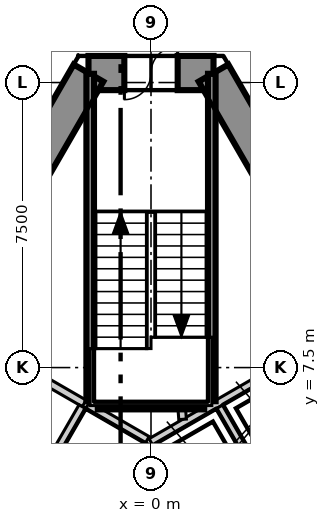
"""IFC4 building model, lengths in metres.
Left out: names, types, materials, properties, quantities, classifications, styles, units other than length and angle.
Written with IfcOpenShell. Run it as: python <this file> out.ifc"""

import sys

from ifc_helpers import new_model, si_unit, direction, frame, frame_2d, origin, place, context, subcontext, project, spatial, polyline, rectangle, outline, extrude, element, fill, save


model = new_model("IFC4")
c1 = context("Model", 3, precision=1e-05, world=origin(), true_north=direction((0.0, 1.0)))
c2 = subcontext(c1, "Body", "Model", "MODEL_VIEW")
j1 = project(units=[si_unit("LENGTHUNIT", "METRE"), si_unit("PLANEANGLEUNIT", "RADIAN")], contexts=[c1])
p1 = place(None, origin())
s1 = spatial("IfcSite", under=j1, at=p1, CompositionType="ELEMENT")
p2 = place(p1, origin())
s2 = spatial("IfcBuilding", under=s1, at=p2, CompositionType="ELEMENT")
p3 = place(p2, frame((0.0, 0.0, 71.3)))
s3 = spatial("IfcBuildingStorey", under=s2, at=p3, CompositionType="ELEMENT", Elevation=71.3)
p4 = place(p3, frame((1.645, 15.25, -0.3), z_axis=(0.0, 0.0, 1.0), x_axis=(-1.0, 0.0, 0.0)))
e1 = element("IfcWall", 1, at=p4, inside=s3, PredefinedType="SHEAR", context=c2, shape_type="SweptSolid", body=[
    extrude(outline(polyline([(-0.26, -0.45), (1.645, -0.45), (3.55, -0.45), (3.031, 0.45), (1.645, 0.45), (0.259, 0.45), (-0.26, -0.45)])), origin(), (0.0, 0.0, 1.0), 4.0),
])
p5 = place(p4, frame((0.945, 0.0, 0.3)))
e2 = element("IfcOpeningElement", 2, at=p5, cuts=e1, PredefinedType="OPENING", context=c2, shape_type="SweptSolid", body=[
    extrude(rectangle(XDim=1.4, YDim=2.1, at=frame_2d((0.7, 1.05))), frame((0.0, 0.46, 0.0), z_axis=(0.0, -1.0, 0.0), x_axis=(1.0, 0.0, 0.0)), (0.0, 0.0, 1.0), 0.92),
])
p6 = place(p3, frame((-1.645, 15.25, -0.3), z_axis=(0.0, 0.0, 1.0), x_axis=(-0.500026485275, -0.866010111964, 0.0)))
e3 = element("IfcWall", 3, at=p6, inside=s3, PredefinedType="SHEAR", context=c2, shape_type="SweptSolid", body=[
    extrude(outline(polyline([(-0.26, -0.45), (1.685, -0.45), (3.63, -0.45), (5.576, -0.45), (7.521, -0.45), (9.466, -0.449), (11.411, -0.449), (13.357, -0.449), (15.302, -0.449), (17.247, -0.449), (19.192, -0.449), (21.138, -0.449), (23.083, -0.449), (25.028, -0.449), (24.509, 0.45), (22.644, 0.45), (20.778, 0.45), (18.913, 0.45), (17.048, 0.45), (15.182, 0.449), (13.317, 0.449), (11.452, 0.449), (9.587, 0.449), (7.721, 0.449), (5.856, 0.449), (3.991, 0.449), (2.125, 0.449), (0.26, 0.449), (-0.26, -0.45)])), origin(), (0.0, 0.0, 1.0), 4.0),
])
p7 = place(p6, frame((11.834, 0.0, 0.3)))
e4 = element("IfcOpeningElement", 4, at=p7, cuts=e3, PredefinedType="OPENING", context=c2, shape_type="SweptSolid", body=[
    extrude(rectangle(XDim=1.1, YDim=2.1, at=frame_2d((0.55, 1.05))), frame((0.0, 0.46, 0.0), z_axis=(0.0, -1.0, 0.0), x_axis=(1.0, 0.0, 0.0)), (0.0, 0.0, 1.0), 0.92),
])
p8 = place(p6, frame((8.13, 0.0, 0.3)))
e5 = element("IfcOpeningElement", 5, at=p8, cuts=e3, PredefinedType="OPENING", context=c2, shape_type="SweptSolid", body=[
    extrude(rectangle(XDim=0.9, YDim=2.1, at=frame_2d((0.45, 1.05))), frame((0.0, 0.46, 0.0), z_axis=(0.0, -1.0, 0.0), x_axis=(1.0, 0.0, 0.0)), (0.0, 0.0, 1.0), 0.92),
])
p9 = place(p6, frame((3.255, 0.0, 0.3)))
e6 = element("IfcOpeningElement", 6, at=p9, cuts=e3, PredefinedType="OPENING", context=c2, shape_type="SweptSolid", body=[
    extrude(rectangle(XDim=0.9, YDim=2.1, at=frame_2d((0.45, 1.05))), frame((0.0, 0.46, 0.0), z_axis=(0.0, -1.0, 0.0), x_axis=(1.0, 0.0, 0.0)), (0.0, 0.0, 1.0), 0.92),
])
p10 = place(p3, frame((14.03, -6.2, -0.3), z_axis=(0.0, 0.0, 1.0), x_axis=(-0.500026485275, 0.866010111964, 0.0)))
e7 = element("IfcWall", 7, at=p10, inside=s3, PredefinedType="SHEAR", context=c2, shape_type="SweptSolid", body=[
    extrude(outline(polyline([(-0.26, -0.449), (1.685, -0.449), (3.63, -0.449), (5.576, -0.449), (7.521, -0.449), (9.466, -0.449), (11.411, -0.449), (13.357, -0.449), (15.302, -0.449), (17.247, -0.45), (19.192, -0.45), (21.138, -0.45), (23.083, -0.45), (25.028, -0.45), (24.509, 0.449), (22.644, 0.449), (20.778, 0.449), (18.913, 0.449), (17.048, 0.449), (15.182, 0.449), (13.317, 0.449), (11.452, 0.449), (9.587, 0.449), (7.721, 0.45), (5.856, 0.45), (3.991, 0.45), (2.125, 0.45), (0.26, 0.45), (-0.26, -0.449)])), origin(), (0.0, 0.0, 1.0), 4.0),
])
p11 = place(p10, frame((11.484, 0.0, 0.3)))
e8 = element("IfcOpeningElement", 8, at=p11, cuts=e7, PredefinedType="OPENING", context=c2, shape_type="SweptSolid", body=[
    extrude(rectangle(XDim=1.8, YDim=2.1, at=frame_2d((0.9, 1.05))), frame((0.0, 0.46, 0.0), z_axis=(0.0, -1.0, 0.0), x_axis=(1.0, 0.0, 0.0)), (0.0, 0.0, 1.0), 0.92),
])
p12 = place(p10, frame((4.892, 0.0, 0.3)))
e9 = element("IfcOpeningElement", 9, at=p12, cuts=e7, PredefinedType="OPENING", context=c2, shape_type="SweptSolid", body=[
    extrude(rectangle(XDim=0.9, YDim=2.1, at=frame_2d((0.45, 1.05))), frame((0.0, 0.46, 0.0), z_axis=(0.0, -1.0, 0.0), x_axis=(1.0, 0.0, 0.0)), (0.0, 0.0, 1.0), 0.92),
])
p13 = place(p10, frame((18.976, 0.0, 0.3)))
e10 = element("IfcOpeningElement", 10, at=p13, cuts=e7, PredefinedType="OPENING", context=c2, shape_type="SweptSolid", body=[
    extrude(rectangle(XDim=0.9, YDim=2.1, at=frame_2d((0.45, 1.05))), frame((0.0, 0.46, 0.0), z_axis=(0.0, -1.0, 0.0), x_axis=(1.0, 0.0, 0.0)), (0.0, 0.0, 1.0), 0.92),
])
p14 = place(p3, frame((-19.497, -11.17, 0.0), z_axis=(0.0, 0.0, 1.0), x_axis=(0.499998854553, 0.866026065108, 0.0)))
e11 = element("IfcWall", 11, at=p14, inside=s3, PredefinedType="PARTITIONING", context=c2, shape_type="SweptSolid", body=[
    extrude(rectangle(XDim=38.994, YDim=0.15, at=frame_2d((19.497, 0.0))), origin(), (0.0, 0.0, 1.0), 3.7),
])
p15 = place(p14, frame((35.944, 0.0, 0.0)))
e12 = element("IfcOpeningElement", 12, at=p15, cuts=e11, PredefinedType="OPENING", context=c2, shape_type="SweptSolid", body=[
    extrude(rectangle(XDim=1.1, YDim=2.1, at=frame_2d((0.55, 1.05))), frame((0.0, 0.085, 0.0), z_axis=(0.0, -1.0, 0.0), x_axis=(1.0, 0.0, 0.0)), (0.0, 0.0, 1.0), 0.17),
])
p16 = place(p14, frame((26.148, 0.0, 0.0)))
e13 = element("IfcOpeningElement", 13, at=p16, cuts=e11, PredefinedType="OPENING", context=c2, shape_type="SweptSolid", body=[
    extrude(rectangle(XDim=1.1, YDim=2.1, at=frame_2d((0.55, 1.05))), frame((0.0, 0.085, 0.0), z_axis=(0.0, -1.0, 0.0), x_axis=(1.0, 0.0, 0.0)), (0.0, 0.0, 1.0), 0.17),
])
p17 = place(p14, frame((8.572, 0.0, 0.0)))
e14 = element("IfcOpeningElement", 14, at=p17, cuts=e11, PredefinedType="OPENING", context=c2, shape_type="SweptSolid", body=[
    extrude(rectangle(XDim=1.1, YDim=2.1, at=frame_2d((0.55, 1.05))), frame((0.0, 0.085, 0.0), z_axis=(0.0, -1.0, 0.0), x_axis=(1.0, 0.0, 0.0)), (0.0, 0.0, 1.0), 0.17),
])
p18 = place(p14, frame((17.172, 0.0, 0.0)))
e15 = element("IfcOpeningElement", 15, at=p18, cuts=e11, PredefinedType="OPENING", context=c2, shape_type="SweptSolid", body=[
    extrude(rectangle(XDim=0.9, YDim=2.1, at=frame_2d((0.45, 1.05))), frame((0.0, 0.085, 0.0), z_axis=(0.0, -1.0, 0.0), x_axis=(1.0, 0.0, 0.0)), (0.0, 0.0, 1.0), 0.17),
])
p19 = place(p14, frame((14.172, 0.0, 0.0)))
e16 = element("IfcOpeningElement", 16, at=p19, cuts=e11, PredefinedType="OPENING", context=c2, shape_type="SweptSolid", body=[
    extrude(rectangle(XDim=0.9, YDim=2.1, at=frame_2d((0.45, 1.05))), frame((0.0, 0.085, 0.0), z_axis=(0.0, -1.0, 0.0), x_axis=(1.0, 0.0, 0.0)), (0.0, 0.0, 1.0), 0.17),
])
p20 = place(p14, frame((1.797, 0.0, 0.0)))
e17 = element("IfcOpeningElement", 17, at=p20, cuts=e11, PredefinedType="OPENING", context=c2, shape_type="SweptSolid", body=[
    extrude(rectangle(XDim=1.1, YDim=2.1, at=frame_2d((0.55, 1.05))), frame((0.0, 0.085, 0.0), z_axis=(0.0, -1.0, 0.0), x_axis=(1.0, 0.0, 0.0)), (0.0, 0.0, 1.0), 0.17),
])
p21 = place(p3, frame((0.075, 22.47, 0.0), z_axis=(0.0, 0.0, 1.0), x_axis=(0.500002280369, -0.866024087209, 0.0)))
e18 = element("IfcWall", 18, at=p21, inside=s3, PredefinedType="PARTITIONING", context=c2, shape_type="SweptSolid", body=[
    extrude(rectangle(XDim=38.844, YDim=0.15, at=frame_2d((19.422, 0.0))), origin(), (0.0, 0.0, 1.0), 3.7),
])
p22 = place(p21, frame((35.944, 0.0, 0.0)))
e19 = element("IfcOpeningElement", 19, at=p22, cuts=e18, PredefinedType="OPENING", context=c2, shape_type="SweptSolid", body=[
    extrude(rectangle(XDim=1.1, YDim=2.1, at=frame_2d((0.55, 1.05))), frame((0.0, 0.085, 0.0), z_axis=(0.0, -1.0, 0.0), x_axis=(1.0, 0.0, 0.0)), (0.0, 0.0, 1.0), 0.17),
])
p23 = place(p21, frame((29.848, 0.0, 0.0)))
e20 = element("IfcOpeningElement", 20, at=p23, cuts=e18, PredefinedType="OPENING", context=c2, shape_type="SweptSolid", body=[
    extrude(rectangle(XDim=1.0, YDim=2.1, at=frame_2d((0.5, 1.05))), frame((0.0, 0.085, 0.0), z_axis=(0.0, -1.0, 0.0), x_axis=(1.0, 0.0, 0.0)), (0.0, 0.0, 1.0), 0.17),
])
p24 = place(p21, frame((14.46, 0.0, 0.0)))
e21 = element("IfcOpeningElement", 21, at=p24, cuts=e18, PredefinedType="OPENING", context=c2, shape_type="SweptSolid", body=[
    extrude(rectangle(XDim=1.1, YDim=2.1, at=frame_2d((0.55, 1.05))), frame((0.0, 0.085, 0.0), z_axis=(0.0, -1.0, 0.0), x_axis=(1.0, 0.0, 0.0)), (0.0, 0.0, 1.0), 0.17),
])
p25 = place(p21, frame((24.66, 0.0, 0.0)))
e22 = element("IfcOpeningElement", 22, at=p25, cuts=e18, PredefinedType="OPENING", context=c2, shape_type="SweptSolid", body=[
    extrude(rectangle(XDim=0.9, YDim=2.1, at=frame_2d((0.45, 1.05))), frame((0.0, 0.085, 0.0), z_axis=(0.0, -1.0, 0.0), x_axis=(1.0, 0.0, 0.0)), (0.0, 0.0, 1.0), 0.17),
])
p26 = place(p21, frame((21.46, 0.0, 0.0)))
e23 = element("IfcOpeningElement", 23, at=p26, cuts=e18, PredefinedType="OPENING", context=c2, shape_type="SweptSolid", body=[
    extrude(rectangle(XDim=0.9, YDim=2.1, at=frame_2d((0.45, 1.05))), frame((0.0, 0.085, 0.0), z_axis=(0.0, -1.0, 0.0), x_axis=(1.0, 0.0, 0.0)), (0.0, 0.0, 1.0), 0.17),
])
p27 = place(p21, frame((18.66, 0.0, 0.0)))
e24 = element("IfcOpeningElement", 24, at=p27, cuts=e18, PredefinedType="OPENING", context=c2, shape_type="SweptSolid", body=[
    extrude(rectangle(XDim=1.0, YDim=2.1, at=frame_2d((0.5, 1.05))), frame((0.0, 0.085, 0.0), z_axis=(0.0, -1.0, 0.0), x_axis=(1.0, 0.0, 0.0)), (0.0, 0.0, 1.0), 0.17),
])
p28 = place(p21, frame((6.785, 0.0, 0.0)))
e25 = element("IfcOpeningElement", 25, at=p28, cuts=e18, PredefinedType="OPENING", context=c2, shape_type="SweptSolid", body=[
    extrude(rectangle(XDim=1.0, YDim=2.1, at=frame_2d((0.5, 1.05))), frame((0.0, 0.085, 0.0), z_axis=(0.0, -1.0, 0.0), x_axis=(1.0, 0.0, 0.0)), (0.0, 0.0, 1.0), 0.17),
])
p29 = place(p21, frame((10.485, 0.0, 0.0)))
e26 = element("IfcOpeningElement", 26, at=p29, cuts=e18, PredefinedType="OPENING", context=c2, shape_type="SweptSolid", body=[
    extrude(rectangle(XDim=0.9, YDim=2.1, at=frame_2d((0.45, 1.05))), frame((0.0, 0.085, 0.0), z_axis=(0.0, -1.0, 0.0), x_axis=(1.0, 0.0, 0.0)), (0.0, 0.0, 1.0), 0.17),
])
p30 = place(p21, frame((1.796, 0.0, 0.0)))
e27 = element("IfcOpeningElement", 27, at=p30, cuts=e18, PredefinedType="OPENING", context=c2, shape_type="SweptSolid", body=[
    extrude(rectangle(XDim=1.1, YDim=2.1, at=frame_2d((0.55, 1.05))), frame((0.0, 0.085, 0.0), z_axis=(0.0, -1.0, 0.0), x_axis=(1.0, 0.0, 0.0)), (0.0, 0.0, 1.0), 0.17),
])
p31 = place(p3, frame((-0.002, 5.541, 0.0), z_axis=(0.0, 0.0, 1.0), x_axis=(0.86600155993, 0.500041296494, 0.0)))
e28 = element("IfcWall", 28, at=p31, inside=s3, PredefinedType="SOLIDWALL", context=c2, shape_type="SweptSolid", body=[
    extrude(rectangle(XDim=4.132, YDim=0.2, at=frame_2d((2.066, 0.0))), origin(), (0.0, 0.0, 1.0), 3.7),
])
p32 = place(p3, frame((1.578, 2.874, 0.0), z_axis=(0.0, 0.0, 1.0), x_axis=(0.866031483044, 0.499989470266, 0.0)))
e29 = element("IfcWall", 29, at=p32, inside=s3, PredefinedType="SOLIDWALL", context=c2, shape_type="SweptSolid", body=[
    extrude(rectangle(XDim=6.226, YDim=0.2, at=frame_2d((3.113, 0.0))), origin(), (0.0, 0.0, 1.0), 3.7),
])
p33 = place(p32, frame((2.496, 0.0, 0.0)))
e30 = element("IfcOpeningElement", 30, at=p33, cuts=e29, PredefinedType="OPENING", context=c2, shape_type="SweptSolid", body=[
    extrude(rectangle(XDim=1.1, YDim=2.1, at=frame_2d((0.55, 1.05))), frame((0.0, 0.11, 0.0), z_axis=(0.0, -1.0, 0.0), x_axis=(1.0, 0.0, 0.0)), (0.0, 0.0, 1.0), 0.22),
])
p34 = place(p3, frame((1.807, 6.47, 0.0), z_axis=(0.0, 0.0, 1.0), x_axis=(0.50012328804, -0.865954211699, 0.0)))
e31 = element("IfcWall", 31, at=p34, inside=s3, PredefinedType="SOLIDWALL", context=c2, shape_type="SweptSolid", body=[
    extrude(rectangle(XDim=2.9, YDim=0.2, at=frame_2d((1.45, 0.0))), origin(), (0.0, 0.0, 1.0), 3.7),
])
p35 = place(p3, frame((-3.489, 7.557, 0.0), z_axis=(0.0, 0.0, 1.0), x_axis=(0.866010750942, -0.50002537861, 0.0)))
e32 = element("IfcWall", 32, at=p35, inside=s3, PredefinedType="SOLIDWALL", context=c2, shape_type="SweptSolid", body=[
    extrude(rectangle(XDim=2.0, YDim=0.2, at=frame_2d((1.0, 0.0))), origin(), (0.0, 0.0, 1.0), 3.7),
])
p36 = place(p3, frame((-3.257, 3.959, 0.0), z_axis=(0.0, 0.0, 1.0), x_axis=(0.50012328804, 0.865954211699, 0.0)))
e33 = element("IfcWall", 33, at=p36, inside=s3, PredefinedType="SOLIDWALL", context=c2, shape_type="SweptSolid", body=[
    extrude(rectangle(XDim=2.9, YDim=0.2, at=frame_2d((1.45, 0.0))), origin(), (0.0, 0.0, 1.0), 3.7),
])
p37 = place(p3, frame((-1.67, 6.507, 0.0), z_axis=(0.0, 0.0, 1.0), x_axis=(0.865941441609, -0.500145398563, 0.0)))
e34 = element("IfcWall", 34, at=p37, inside=s3, PredefinedType="SOLIDWALL", context=c2, shape_type="SweptSolid", body=[
    extrude(rectangle(XDim=1.815, YDim=0.2, at=frame_2d((0.908, 0.0))), origin(), (0.0, 0.0, 1.0), 3.7),
])
p38 = place(p3, frame((0.811, 6.4, 0.0), z_axis=(0.0, 0.0, 1.0), x_axis=(0.076199063602, -0.997092624938, 0.0)))
e35 = element("IfcWall", 35, at=p38, inside=s3, PredefinedType="SOLIDWALL", context=c2, shape_type="SweptSolid", body=[
    extrude(rectangle(XDim=0.263, YDim=0.2, at=frame_2d((0.131, 0.0))), origin(), (0.0, 0.0, 1.0), 3.7),
])
p39 = place(p3, frame((1.6, 6.615, 0.0), z_axis=(0.0, 0.0, 1.0), x_axis=(0.0, 1.0, 0.0)))
e36 = element("IfcWall", 36, at=p39, inside=s3, PredefinedType="SOLIDWALL", context=c2, shape_type="SweptSolid", body=[
    extrude(rectangle(XDim=8.615, YDim=0.2, at=frame_2d((4.308, 0.0))), origin(), (0.0, 0.0, 1.0), 3.7),
])
p40 = place(p3, frame((-1.4, 6.5, 0.0), z_axis=(0.0, 0.0, 1.0), x_axis=(1.0, 0.0, 0.0)))
e37 = element("IfcWall", 37, at=p40, inside=s3, PredefinedType="SOLIDWALL", context=c2, shape_type="SweptSolid", body=[
    extrude(rectangle(XDim=2.8, YDim=0.2, at=frame_2d((1.4, 0.0))), origin(), (0.0, 0.0, 1.0), 3.7),
])
p41 = place(p3, frame((-1.6, 6.615, 0.0), z_axis=(0.0, 0.0, 1.0), x_axis=(0.0, 1.0, 0.0)))
e38 = element("IfcWall", 38, at=p41, inside=s3, PredefinedType="SOLIDWALL", context=c2, shape_type="SweptSolid", body=[
    extrude(rectangle(XDim=8.615, YDim=0.2, at=frame_2d((4.308, 0.0))), origin(), (0.0, 0.0, 1.0), 3.7),
])
p42 = place(p5, origin())
e39 = element("IfcDoor", 39, at=p42, inside=s3, OperationType="DOUBLE_DOOR_SINGLE_SWING", PredefinedType="DOOR", context=c2, shape_type="SweptSolid", body=[
    extrude(rectangle(XDim=1.4, YDim=2.1, at=frame_2d((0.7, 1.05))), frame((0.0, 0.025, 0.0), z_axis=(0.0, -1.0, 0.0), x_axis=(1.0, 0.0, 0.0)), (0.0, 0.0, 1.0), 0.05),
])
fill(e2, e39)
save(model, sys.argv[1])
